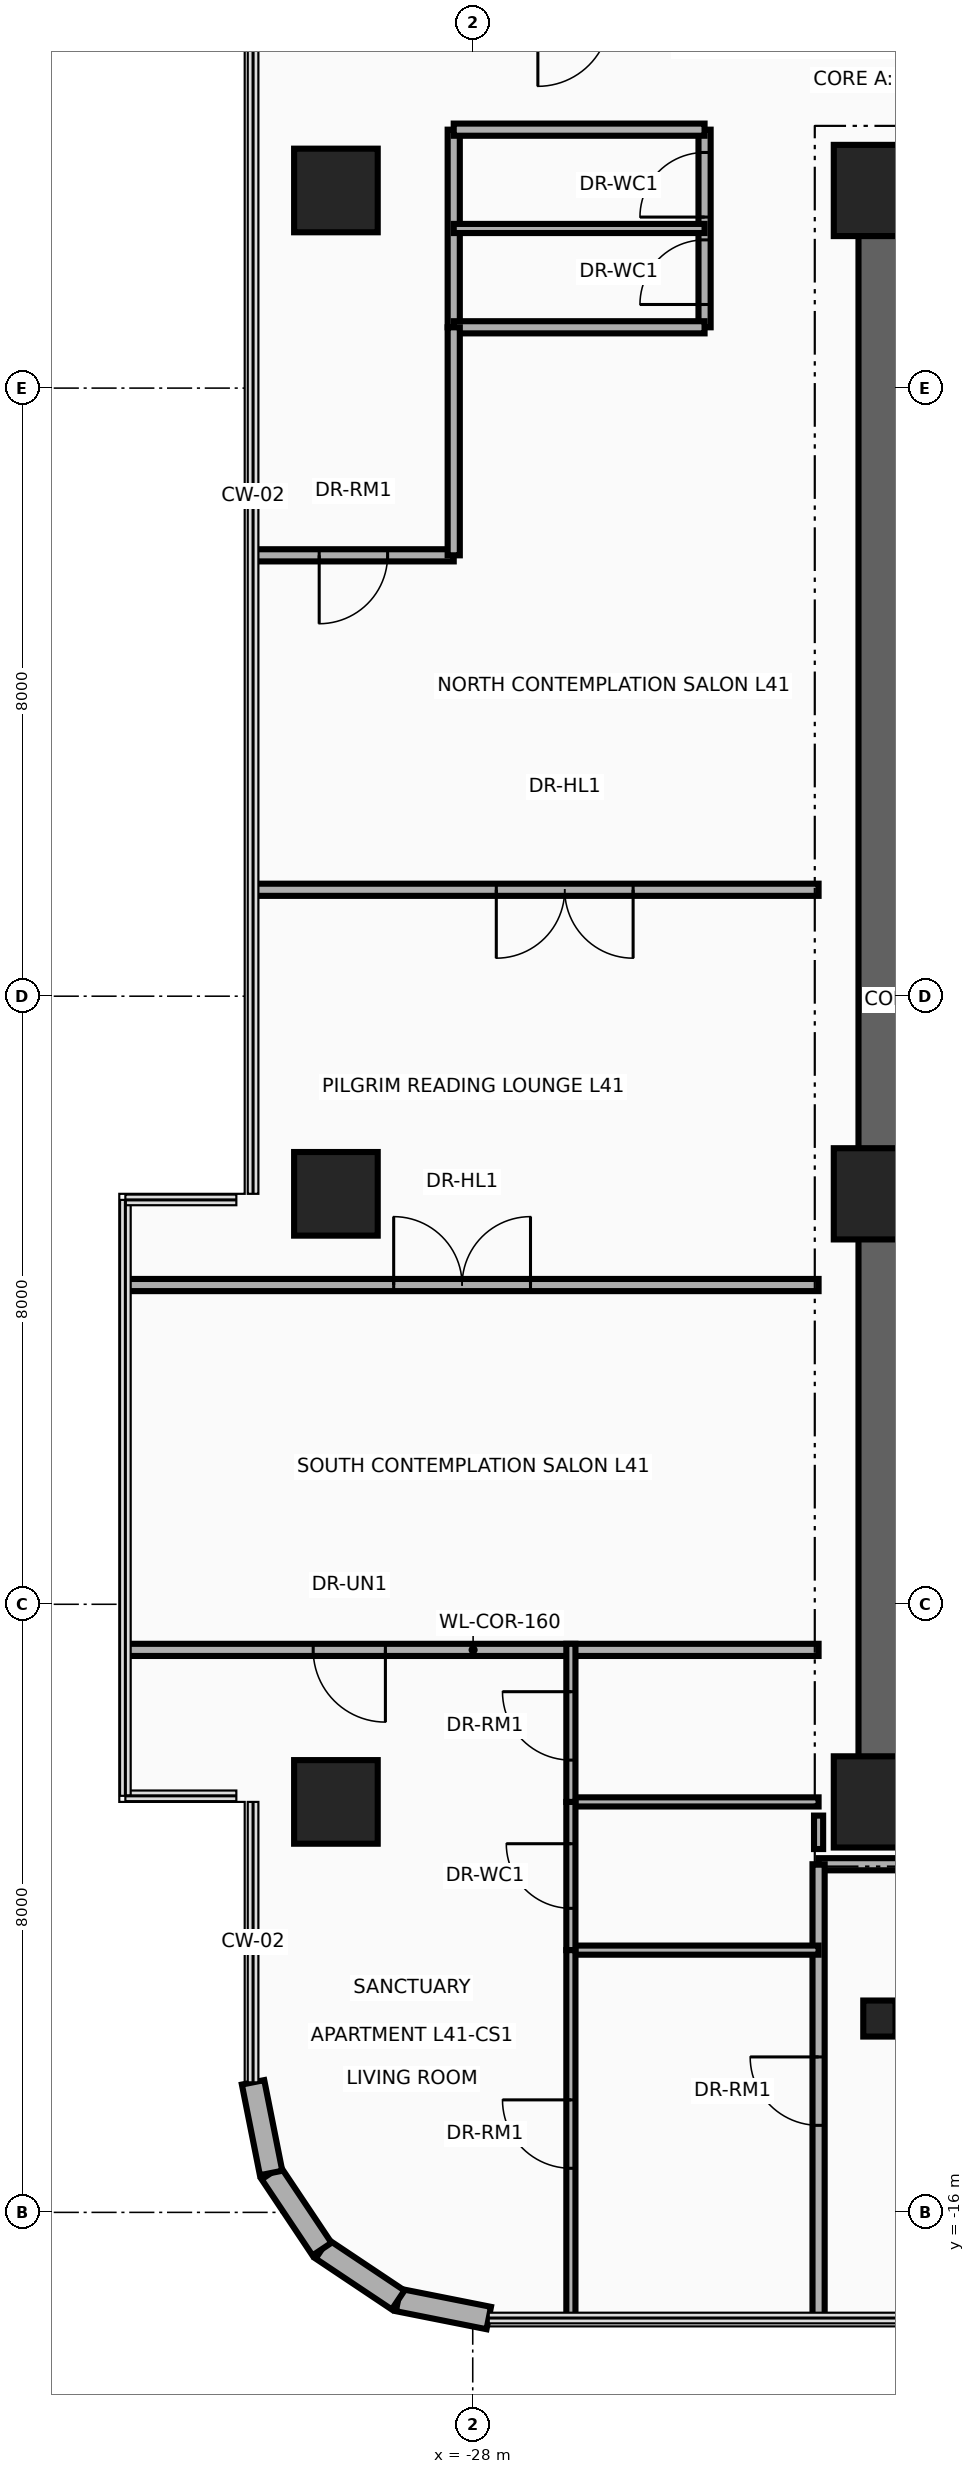
"""IFC4 building model, lengths in metres.
Left out: names, types, materials, properties, quantities, classifications, styles, units other than length and angle.
Written with IfcOpenShell. Run it as: python <this file> out.ifc"""

import sys

from ifc_helpers import new_model, si_unit, direction, frame, frame_2d, origin, origin_2d, place, context, subcontext, project, spatial, rectangle, circle, i_section, extrude, source, transform, mapped, element, fill, save


model = new_model("IFC4")
c1 = context("Model", 3, precision=1e-05, world=origin(), true_north=direction((0.0, 1.0)))
c2 = subcontext(c1, "Body", "Model", "MODEL_VIEW")
j1 = project(units=[si_unit("LENGTHUNIT", "METRE"), si_unit("PLANEANGLEUNIT", "RADIAN")], contexts=[c1])
p1 = place(None, origin())
s1 = spatial("IfcSite", under=j1, at=p1, CompositionType="ELEMENT")
p2 = place(p1, origin())
s2 = spatial("IfcBuilding", under=s1, at=p2, CompositionType="ELEMENT")
p3 = place(p2, frame((0.0, 0.0, 161.2)))
s3 = spatial("IfcBuildingStorey", under=s2, at=p3, CompositionType="ELEMENT", Elevation=161.2)
p4 = place(p3, frame((-22.65, -11.075, 0.0), z_axis=(0.0, 0.0, 1.0), x_axis=(0.0, 1.0, 0.0)))
e1 = element("IfcWall", 1, at=p4, inside=s3, PredefinedType="SHEAR", context=c2, shape_type="SweptSolid", body=[
    extrude(rectangle(XDim=22.15, YDim=0.55, at=frame_2d((11.075, 0.0))), origin(), (0.0, 0.0, 1.0), 3.46),
])
for number, where, z_axis, x_axis in (
    (2, (-22.65, 10.8, 0.0), (0.0, 0.0, 1.0), (1.0, 0.0, 0.0)),
    (3, (-22.65, -10.8, 0.0), (0.0, 0.0, 1.0), (1.0, 0.0, 0.0)),
):
    element("IfcWall", number, at=place(p3, frame(where, z_axis=z_axis, x_axis=x_axis)), inside=s3, PredefinedType="SHEAR", context=c2, shape_type="SweptSolid", body=[
        extrude(rectangle(XDim=10.25, YDim=0.55, at=frame_2d((5.125, 0.0))), origin(), (0.0, 0.0, 1.0), 3.46),
    ])
m1 = source(origin(), c2, "Body", "SweptSolid", [
    extrude(circle(Radius=0.55, at=origin_2d()), origin(), (0.0, 0.0, 1.0), 3.7),
])
p5 = place(p3, frame((-29.8, -10.6, 0.0), z_axis=(0.0, 0.0, 1.0), x_axis=(1.0, 0.0, 0.0)))
e4 = element("IfcColumn", 4, at=p5, inside=s3, PredefinedType="COLUMN", context=c2, shape_type="MappedRepresentation", body=[
    mapped(m1, transform((0.0, 0.0, 0.0), x_axis=(1.0, 0.0, 0.0), y_axis=(0.0, 1.0, 0.0), z_axis=(0.0, 0.0, 1.0), scale=1.0)),
])
m2 = source(origin(), c2, "Body", "SweptSolid", [
    extrude(rectangle(XDim=1.2, YDim=1.2, at=origin_2d()), origin(), (0.0, 0.0, 1.0), 3.7),
])
p6 = place(p3, frame((-22.65, -10.6, 0.0), z_axis=(0.0, 0.0, 1.0), x_axis=(1.0, 0.0, 0.0)))
e5 = element("IfcColumn", 5, at=p6, inside=s3, PredefinedType="COLUMN", context=c2, shape_type="MappedRepresentation", body=[
    mapped(m2, transform((0.0, 0.0, 0.0), x_axis=(1.0, 0.0, 0.0), y_axis=(0.0, 1.0, 0.0), z_axis=(0.0, 0.0, 1.0), scale=1.0)),
])
p7 = place(p3, frame((-29.8, -2.6, 0.0), z_axis=(0.0, 0.0, 1.0), x_axis=(1.0, 0.0, 0.0)))
e6 = element("IfcColumn", 6, at=p7, inside=s3, PredefinedType="COLUMN", context=c2, shape_type="MappedRepresentation", body=[
    mapped(m1, transform((0.0, 0.0, 0.0), x_axis=(1.0, 0.0, 0.0), y_axis=(0.0, 1.0, 0.0), z_axis=(0.0, 0.0, 1.0), scale=1.0)),
])
p8 = place(p3, frame((-22.65, -2.6, 0.0), z_axis=(0.0, 0.0, 1.0), x_axis=(1.0, 0.0, 0.0)))
e7 = element("IfcColumn", 7, at=p8, inside=s3, PredefinedType="COLUMN", context=c2, shape_type="MappedRepresentation", body=[
    mapped(m2, transform((0.0, 0.0, 0.0), x_axis=(1.0, 0.0, 0.0), y_axis=(0.0, 1.0, 0.0), z_axis=(0.0, 0.0, 1.0), scale=1.0)),
])
p9 = place(p3, frame((-29.8, 10.6, 0.0), z_axis=(0.0, 0.0, 1.0), x_axis=(1.0, 0.0, 0.0)))
e8 = element("IfcColumn", 8, at=p9, inside=s3, PredefinedType="COLUMN", context=c2, shape_type="MappedRepresentation", body=[
    mapped(m1, transform((0.0, 0.0, 0.0), x_axis=(1.0, 0.0, 0.0), y_axis=(0.0, 1.0, 0.0), z_axis=(0.0, 0.0, 1.0), scale=1.0)),
])
p10 = place(p3, frame((-22.65, 10.6, 0.0), z_axis=(0.0, 0.0, 1.0), x_axis=(1.0, 0.0, 0.0)))
e9 = element("IfcColumn", 9, at=p10, inside=s3, PredefinedType="COLUMN", context=c2, shape_type="MappedRepresentation", body=[
    mapped(m2, transform((0.0, 0.0, 0.0), x_axis=(1.0, 0.0, 0.0), y_axis=(0.0, 1.0, 0.0), z_axis=(0.0, 0.0, 1.0), scale=1.0)),
])
m3 = source(origin(), c2, "Body", "SweptSolid", [
    extrude(i_section(OverallWidth=0.424, OverallDepth=0.474, WebThickness=0.048, FlangeThickness=0.077, at=origin_2d()), origin(), (0.0, 0.0, 1.0), 3.7),
])
p11 = place(p3, frame((-22.65, -13.45, 0.0), z_axis=(0.0, 0.0, 1.0), x_axis=(1.0, 0.0, 0.0)))
e10 = element("IfcColumn", 10, at=p11, inside=s3, PredefinedType="COLUMN", context=c2, shape_type="MappedRepresentation", body=[
    mapped(m3, transform((0.0, 0.0, 0.0), x_axis=(1.0, 0.0, 0.0), y_axis=(0.0, 1.0, 0.0), z_axis=(0.0, 0.0, 1.0), scale=1.0)),
])
p12 = place(p3, frame((-27.789, -17.39, 0.0), z_axis=(0.0, 0.0, 1.0), x_axis=(-0.980804027463, 0.194996050505, 0.0)))
e11 = element("IfcWall", 11, at=p12, inside=s3, PredefinedType="SOLIDWALL", context=c2, shape_type="SweptSolid", body=[
    extrude(rectangle(XDim=1.216, YDim=0.3, at=frame_2d((0.608, 0.0))), origin(), (0.0, 0.0, 1.0), 3.46),
])
for number, where, z_axis, x_axis in (
    (12, (-28.982, -17.153, 0.0), (0.0, 0.0, 1.0), (-0.831, 0.556, 0.0)),
    (13, (-29.983, -16.483, 0.0), (0.0, 0.0, 1.0), (-0.556, 0.831, 0.0)),
):
    element("IfcWall", number, at=place(p3, frame(where, z_axis=z_axis, x_axis=x_axis)), inside=s3, PredefinedType="SOLIDWALL", context=c2, shape_type="SweptSolid", body=[
        extrude(rectangle(XDim=1.205, YDim=0.3, at=frame_2d((0.603, 0.0))), origin(), (0.0, 0.0, 1.0), 3.46),
    ])
p13 = place(p3, frame((-30.653, -15.482, 0.0), z_axis=(0.0, 0.0, 1.0), x_axis=(-0.194996050505, 0.980804027463, 0.0)))
e14 = element("IfcWall", 14, at=p13, inside=s3, PredefinedType="SOLIDWALL", context=c2, shape_type="SweptSolid", body=[
    extrude(rectangle(XDim=1.216, YDim=0.3, at=frame_2d((0.608, 0.0))), origin(), (0.0, 0.0, 1.0), 3.46),
])
p14 = place(p3, frame((-28.25, 8.8, 0.0), z_axis=(0.0, 0.0, 1.0), x_axis=(0.0, 1.0, 0.0)))
e15 = element("IfcWall", 15, at=p14, inside=s3, PredefinedType="PARTITIONING", context=c2, shape_type="SweptSolid", body=[
    extrude(rectangle(XDim=2.6, YDim=0.16, at=frame_2d((1.3, 0.0))), origin(), (0.0, 0.0, 1.0), 2.666),
])
p15 = place(p3, frame((-24.95, 8.8, 0.0), z_axis=(0.0, 0.0, 1.0), x_axis=(0.0, 1.0, 0.0)))
e16 = element("IfcWall", 16, at=p15, inside=s3, PredefinedType="PARTITIONING", context=c2, shape_type="SweptSolid", body=[
    extrude(rectangle(XDim=2.6, YDim=0.16, at=frame_2d((1.3, 0.0))), origin(), (0.0, 0.0, 1.0), 2.666),
])
p16 = place(p15, frame((0.3, 0.0, 0.0)))
e17 = element("IfcOpeningElement", 17, at=p16, cuts=e16, PredefinedType="OPENING", context=c2, shape_type="SweptSolid", body=[
    extrude(rectangle(XDim=0.85, YDim=2.1, at=frame_2d((0.425, 1.05))), frame((0.0, 0.095, 0.0), z_axis=(0.0, -1.0, 0.0), x_axis=(1.0, 0.0, 0.0)), (0.0, 0.0, 1.0), 0.19),
])
p17 = place(p15, frame((1.45, 0.0, 0.0)))
e18 = element("IfcOpeningElement", 18, at=p17, cuts=e16, PredefinedType="OPENING", context=c2, shape_type="SweptSolid", body=[
    extrude(rectangle(XDim=0.85, YDim=2.1, at=frame_2d((0.425, 1.05))), frame((0.0, 0.095, 0.0), z_axis=(0.0, -1.0, 0.0), x_axis=(1.0, 0.0, 0.0)), (0.0, 0.0, 1.0), 0.19),
])
for number, where, z_axis, x_axis in (
    (19, (-28.25, 8.8, 0.0), (0.0, 0.0, 1.0), (1.0, 0.0, 0.0)),
    (20, (-28.25, 11.4, 0.0), (0.0, 0.0, 1.0), (1.0, 0.0, 0.0)),
):
    element("IfcWall", number, at=place(p3, frame(where, z_axis=z_axis, x_axis=x_axis)), inside=s3, PredefinedType="PARTITIONING", context=c2, shape_type="SweptSolid", body=[
        extrude(rectangle(XDim=3.3, YDim=0.16, at=frame_2d((1.65, 0.0))), origin(), (0.0, 0.0, 1.0), 3.46),
    ])
p18 = place(p3, frame((-28.25, 10.1, 0.0), z_axis=(0.0, 0.0, 1.0), x_axis=(1.0, 0.0, 0.0)))
e21 = element("IfcWall", 21, at=p18, inside=s3, PredefinedType="PARTITIONING", context=c2, shape_type="SweptSolid", body=[
    extrude(rectangle(XDim=3.3, YDim=0.12, at=frame_2d((1.65, 0.0))), origin(), (0.0, 0.0, 1.0), 3.46),
])
p19 = place(p3, frame((-23.45, -11.42, 0.0), z_axis=(0.0, 0.0, 1.0), x_axis=(1.0, 0.0, 0.0)))
e22 = element("IfcWall", 22, at=p19, inside=s3, PredefinedType="PARTITIONING", context=c2, shape_type="SweptSolid", body=[
    extrude(rectangle(XDim=13.84, YDim=0.16, at=frame_2d((6.92, 0.0))), origin(), (0.0, 0.0, 1.0), 2.834),
])
p20 = place(p3, frame((-23.45, -17.39, 0.0), z_axis=(0.0, 0.0, 1.0), x_axis=(0.0, 1.0, 0.0)))
e23 = element("IfcWall", 23, at=p20, inside=s3, PredefinedType="PARTITIONING", context=c2, shape_type="SweptSolid", body=[
    extrude(rectangle(XDim=5.97, YDim=0.16, at=frame_2d((2.985, 0.0))), origin(), (0.0, 0.0, 1.0), 3.46),
])
p21 = place(p20, frame((2.535, 0.0, 0.0)))
e24 = element("IfcOpeningElement", 24, at=p21, cuts=e23, PredefinedType="OPENING", context=c2, shape_type="SweptSolid", body=[
    extrude(rectangle(XDim=0.9, YDim=2.1, at=frame_2d((0.45, 1.05))), frame((0.0, 0.095, 0.0), z_axis=(0.0, -1.0, 0.0), x_axis=(1.0, 0.0, 0.0)), (0.0, 0.0, 1.0), 0.19),
])
p22 = place(p3, frame((-32.54, -8.6, 0.0), z_axis=(0.0, 0.0, 1.0), x_axis=(1.0, 0.0, 0.0)))
e25 = element("IfcWall", 25, at=p22, inside=s3, PredefinedType="PARTITIONING", context=c2, shape_type="SweptSolid", body=[
    extrude(rectangle(XDim=9.09, YDim=0.16, at=frame_2d((4.545, 0.0))), origin(), (0.0, 0.0, 1.0), 2.896),
])
p23 = place(p22, frame((2.441, 0.0, 0.0)))
e26 = element("IfcOpeningElement", 26, at=p23, cuts=e25, PredefinedType="OPENING", context=c2, shape_type="SweptSolid", body=[
    extrude(rectangle(XDim=0.95, YDim=2.15, at=frame_2d((0.475, 1.075))), frame((0.0, 0.095, 0.0), z_axis=(0.0, -1.0, 0.0), x_axis=(1.0, 0.0, 0.0)), (0.0, 0.0, 1.0), 0.19),
])
p24 = place(p3, frame((-30.89, 5.8, 0.0), z_axis=(0.0, 0.0, 1.0), x_axis=(1.0, 0.0, 0.0)))
e27 = element("IfcWall", 27, at=p24, inside=s3, PredefinedType="PARTITIONING", context=c2, shape_type="SweptSolid", body=[
    extrude(rectangle(XDim=2.64, YDim=0.16, at=frame_2d((1.32, 0.0))), origin(), (0.0, 0.0, 1.0), 2.896),
])
p25 = place(p24, frame((0.87, 0.0, 0.0)))
e28 = element("IfcOpeningElement", 28, at=p25, cuts=e27, PredefinedType="OPENING", context=c2, shape_type="SweptSolid", body=[
    extrude(rectangle(XDim=0.9, YDim=2.1, at=frame_2d((0.45, 1.05))), frame((0.0, 0.095, 0.0), z_axis=(0.0, -1.0, 0.0), x_axis=(1.0, 0.0, 0.0)), (0.0, 0.0, 1.0), 0.19),
])
p26 = place(p3, frame((-28.25, 5.8, 0.0), z_axis=(0.0, 0.0, 1.0), x_axis=(0.0, 1.0, 0.0)))
e29 = element("IfcWall", 29, at=p26, inside=s3, PredefinedType="PARTITIONING", context=c2, shape_type="SweptSolid", body=[
    extrude(rectangle(XDim=3.0, YDim=0.16, at=frame_2d((1.5, 0.0))), origin(), (0.0, 0.0, 1.0), 2.988),
])
p27 = place(p3, frame((-26.708, -10.6, 0.0), z_axis=(0.0, 0.0, 1.0), x_axis=(1.0, 0.0, 0.0)))
e30 = element("IfcWall", 30, at=p27, inside=s3, PredefinedType="PARTITIONING", context=c2, shape_type="SweptSolid", body=[
    extrude(rectangle(XDim=3.259, YDim=0.12, at=frame_2d((1.629, 0.0))), origin(), (0.0, 0.0, 1.0), 2.666),
])
p28 = place(p3, frame((-26.708, -12.55, 0.0), z_axis=(0.0, 0.0, 1.0), x_axis=(1.0, 0.0, 0.0)))
e31 = element("IfcWall", 31, at=p28, inside=s3, PredefinedType="PARTITIONING", context=c2, shape_type="SweptSolid", body=[
    extrude(rectangle(XDim=3.259, YDim=0.12, at=frame_2d((1.629, 0.0))), origin(), (0.0, 0.0, 1.0), 3.46),
])
p29 = place(p3, frame((-26.708, -12.55, 0.0), z_axis=(0.0, 0.0, 1.0), x_axis=(0.0, 1.0, 0.0)))
e32 = element("IfcWall", 32, at=p29, inside=s3, PredefinedType="PARTITIONING", context=c2, shape_type="SweptSolid", body=[
    extrude(rectangle(XDim=1.95, YDim=0.12, at=frame_2d((0.975, 0.0))), origin(), (0.0, 0.0, 1.0), 2.666),
])
p30 = place(p29, frame((0.55, 0.0, 0.0)))
e33 = element("IfcOpeningElement", 33, at=p30, cuts=e32, PredefinedType="OPENING", context=c2, shape_type="SweptSolid", body=[
    extrude(rectangle(XDim=0.85, YDim=2.1, at=frame_2d((0.425, 1.05))), frame((0.0, 0.075, 0.0), z_axis=(0.0, -1.0, 0.0), x_axis=(1.0, 0.0, 0.0)), (0.0, 0.0, 1.0), 0.15),
])
p31 = place(p3, frame((-26.708, -10.6, 0.0), z_axis=(0.0, 0.0, 1.0), x_axis=(0.0, 1.0, 0.0)))
e34 = element("IfcWall", 34, at=p31, inside=s3, PredefinedType="PARTITIONING", context=c2, shape_type="SweptSolid", body=[
    extrude(rectangle(XDim=2.08, YDim=0.12, at=frame_2d((1.04, 0.0))), origin(), (0.0, 0.0, 1.0), 2.666),
])
p32 = place(p31, frame((0.55, 0.0, 0.0)))
e35 = element("IfcOpeningElement", 35, at=p32, cuts=e34, PredefinedType="OPENING", context=c2, shape_type="SweptSolid", body=[
    extrude(rectangle(XDim=0.9, YDim=2.1, at=frame_2d((0.45, 1.05))), frame((0.0, 0.075, 0.0), z_axis=(0.0, -1.0, 0.0), x_axis=(1.0, 0.0, 0.0)), (0.0, 0.0, 1.0), 0.15),
])
p33 = place(p3, frame((-26.708, -17.39, 0.0), z_axis=(0.0, 0.0, 1.0), x_axis=(0.0, 1.0, 0.0)))
e36 = element("IfcWall", 36, at=p33, inside=s3, PredefinedType="PARTITIONING", context=c2, shape_type="SweptSolid", body=[
    extrude(rectangle(XDim=4.84, YDim=0.12, at=frame_2d((2.42, 0.0))), origin(), (0.0, 0.0, 1.0), 3.46),
])
p34 = place(p33, frame((1.97, 0.0, 0.0)))
e37 = element("IfcOpeningElement", 37, at=p34, cuts=e36, PredefinedType="OPENING", context=c2, shape_type="SweptSolid", body=[
    extrude(rectangle(XDim=0.9, YDim=2.1, at=frame_2d((0.45, 1.05))), frame((0.0, 0.075, 0.0), z_axis=(0.0, -1.0, 0.0), x_axis=(1.0, 0.0, 0.0)), (0.0, 0.0, 1.0), 0.15),
])
p35 = place(p3, frame((-23.45, -11.22, 0.0), z_axis=(0.0, 0.0, 1.0), x_axis=(0.0, 1.0, 0.0)))
e38 = element("IfcWall", 38, at=p35, inside=s3, PredefinedType="PARTITIONING", context=c2, shape_type="SweptSolid", body=[
    extrude(rectangle(XDim=0.44, YDim=0.12, at=frame_2d((0.22, 0.0))), origin(), (0.0, 0.0, 1.0), 2.666),
])
p36 = place(p3, frame((-32.54, -3.8, 0.0), z_axis=(0.0, 0.0, 1.0), x_axis=(1.0, 0.0, 0.0)))
e39 = element("IfcWall", 39, at=p36, inside=s3, PredefinedType="PARTITIONING", context=c2, shape_type="SweptSolid", body=[
    extrude(rectangle(XDim=9.09, YDim=0.16, at=frame_2d((4.545, 0.0))), origin(), (0.0, 0.0, 1.0), 2.896),
])
p37 = place(p36, frame((3.5, 0.0, 0.0)))
e40 = element("IfcOpeningElement", 40, at=p37, cuts=e39, PredefinedType="OPENING", context=c2, shape_type="SweptSolid", body=[
    extrude(rectangle(XDim=1.8, YDim=2.15, at=frame_2d((0.9, 1.075))), frame((0.0, 0.095, 0.0), z_axis=(0.0, -1.0, 0.0), x_axis=(1.0, 0.0, 0.0)), (0.0, 0.0, 1.0), 0.19),
])
p38 = place(p3, frame((-30.89, 1.4, 0.0), z_axis=(0.0, 0.0, 1.0), x_axis=(1.0, 0.0, 0.0)))
e41 = element("IfcWall", 41, at=p38, inside=s3, PredefinedType="PARTITIONING", context=c2, shape_type="SweptSolid", body=[
    extrude(rectangle(XDim=7.44, YDim=0.16, at=frame_2d((3.72, 0.0))), origin(), (0.0, 0.0, 1.0), 2.896),
])
p39 = place(p38, frame((3.2, 0.0, 0.0)))
e42 = element("IfcOpeningElement", 42, at=p39, cuts=e41, PredefinedType="OPENING", context=c2, shape_type="SweptSolid", body=[
    extrude(rectangle(XDim=1.8, YDim=2.15, at=frame_2d((0.9, 1.075))), frame((0.0, 0.095, 0.0), z_axis=(0.0, -1.0, 0.0), x_axis=(1.0, 0.0, 0.0)), (0.0, 0.0, 1.0), 0.19),
])
p40 = place(p16, origin())
e43 = element("IfcDoor", 43, at=p40, inside=s3, OperationType="SINGLE_SWING_LEFT", PredefinedType="DOOR", context=c2, shape_type="SweptSolid", body=[
    extrude(rectangle(XDim=0.85, YDim=2.1, at=frame_2d((0.425, 1.05))), frame((0.0, 0.025, 0.0), z_axis=(0.0, -1.0, 0.0), x_axis=(1.0, 0.0, 0.0)), (0.0, 0.0, 1.0), 0.05),
])
fill(e17, e43)
p41 = place(p17, origin())
e44 = element("IfcDoor", 44, at=p41, inside=s3, OperationType="SINGLE_SWING_RIGHT", PredefinedType="DOOR", context=c2, shape_type="SweptSolid", body=[
    extrude(rectangle(XDim=0.85, YDim=2.1, at=frame_2d((0.425, 1.05))), frame((0.0, 0.025, 0.0), z_axis=(0.0, -1.0, 0.0), x_axis=(1.0, 0.0, 0.0)), (0.0, 0.0, 1.0), 0.05),
])
fill(e18, e44)
p42 = place(p23, frame((0.95, 0.0, 0.0), z_axis=(0.0, 0.0, 1.0), x_axis=(-1.0, 0.0, 0.0)))
e45 = element("IfcDoor", 45, at=p42, inside=s3, OperationType="SINGLE_SWING_LEFT", PredefinedType="DOOR", context=c2, shape_type="SweptSolid", body=[
    extrude(rectangle(XDim=0.95, YDim=2.15, at=frame_2d((0.475, 1.075))), frame((0.0, 0.025, 0.0), z_axis=(0.0, -1.0, 0.0), x_axis=(1.0, 0.0, 0.0)), (0.0, 0.0, 1.0), 0.05),
])
fill(e26, e45)
p43 = place(p30, origin())
e46 = element("IfcDoor", 46, at=p43, inside=s3, OperationType="SINGLE_SWING_RIGHT", PredefinedType="DOOR", context=c2, shape_type="SweptSolid", body=[
    extrude(rectangle(XDim=0.85, YDim=2.1, at=frame_2d((0.425, 1.05))), frame((0.0, 0.025, 0.0), z_axis=(0.0, -1.0, 0.0), x_axis=(1.0, 0.0, 0.0)), (0.0, 0.0, 1.0), 0.05),
])
fill(e33, e46)
p44 = place(p32, origin())
e47 = element("IfcDoor", 47, at=p44, inside=s3, OperationType="SINGLE_SWING_LEFT", PredefinedType="DOOR", context=c2, shape_type="SweptSolid", body=[
    extrude(rectangle(XDim=0.9, YDim=2.1, at=frame_2d((0.45, 1.05))), frame((0.0, 0.025, 0.0), z_axis=(0.0, -1.0, 0.0), x_axis=(1.0, 0.0, 0.0)), (0.0, 0.0, 1.0), 0.05),
])
fill(e35, e47)
p45 = place(p34, origin())
e48 = element("IfcDoor", 48, at=p45, inside=s3, OperationType="SINGLE_SWING_RIGHT", PredefinedType="DOOR", context=c2, shape_type="SweptSolid", body=[
    extrude(rectangle(XDim=0.9, YDim=2.1, at=frame_2d((0.45, 1.05))), frame((0.0, 0.025, 0.0), z_axis=(0.0, -1.0, 0.0), x_axis=(1.0, 0.0, 0.0)), (0.0, 0.0, 1.0), 0.05),
])
fill(e37, e48)
p46 = place(p25, frame((0.9, 0.0, 0.0), z_axis=(0.0, 0.0, 1.0), x_axis=(-1.0, 0.0, 0.0)))
e49 = element("IfcDoor", 49, at=p46, inside=s3, OperationType="SINGLE_SWING_LEFT", PredefinedType="DOOR", context=c2, shape_type="SweptSolid", body=[
    extrude(rectangle(XDim=0.9, YDim=2.1, at=frame_2d((0.45, 1.05))), frame((0.0, 0.025, 0.0), z_axis=(0.0, -1.0, 0.0), x_axis=(1.0, 0.0, 0.0)), (0.0, 0.0, 1.0), 0.05),
])
fill(e28, e49)
p47 = place(p37, origin())
e50 = element("IfcDoor", 50, at=p47, inside=s3, OperationType="DOUBLE_DOOR_SINGLE_SWING", PredefinedType="DOOR", context=c2, shape_type="SweptSolid", body=[
    extrude(rectangle(XDim=1.8, YDim=2.15, at=frame_2d((0.9, 1.075))), frame((0.0, 0.025, 0.0), z_axis=(0.0, -1.0, 0.0), x_axis=(1.0, 0.0, 0.0)), (0.0, 0.0, 1.0), 0.05),
])
fill(e40, e50)
p48 = place(p39, frame((1.8, 0.0, 0.0), z_axis=(0.0, 0.0, 1.0), x_axis=(-1.0, 0.0, 0.0)))
e51 = element("IfcDoor", 51, at=p48, inside=s3, OperationType="DOUBLE_DOOR_SINGLE_SWING", PredefinedType="DOOR", context=c2, shape_type="SweptSolid", body=[
    extrude(rectangle(XDim=1.8, YDim=2.15, at=frame_2d((0.9, 1.075))), frame((0.0, 0.025, 0.0), z_axis=(0.0, -1.0, 0.0), x_axis=(1.0, 0.0, 0.0)), (0.0, 0.0, 1.0), 0.05),
])
fill(e42, e51)
p49 = place(p21, origin())
e52 = element("IfcDoor", 52, at=p49, inside=s3, OperationType="SINGLE_SWING_RIGHT", PredefinedType="DOOR", context=c2, shape_type="SweptSolid", body=[
    extrude(rectangle(XDim=0.9, YDim=2.1, at=frame_2d((0.45, 1.05))), frame((0.0, 0.025, 0.0), z_axis=(0.0, -1.0, 0.0), x_axis=(1.0, 0.0, 0.0)), (0.0, 0.0, 1.0), 0.05),
])
fill(e24, e52)
save(model, sys.argv[1])
